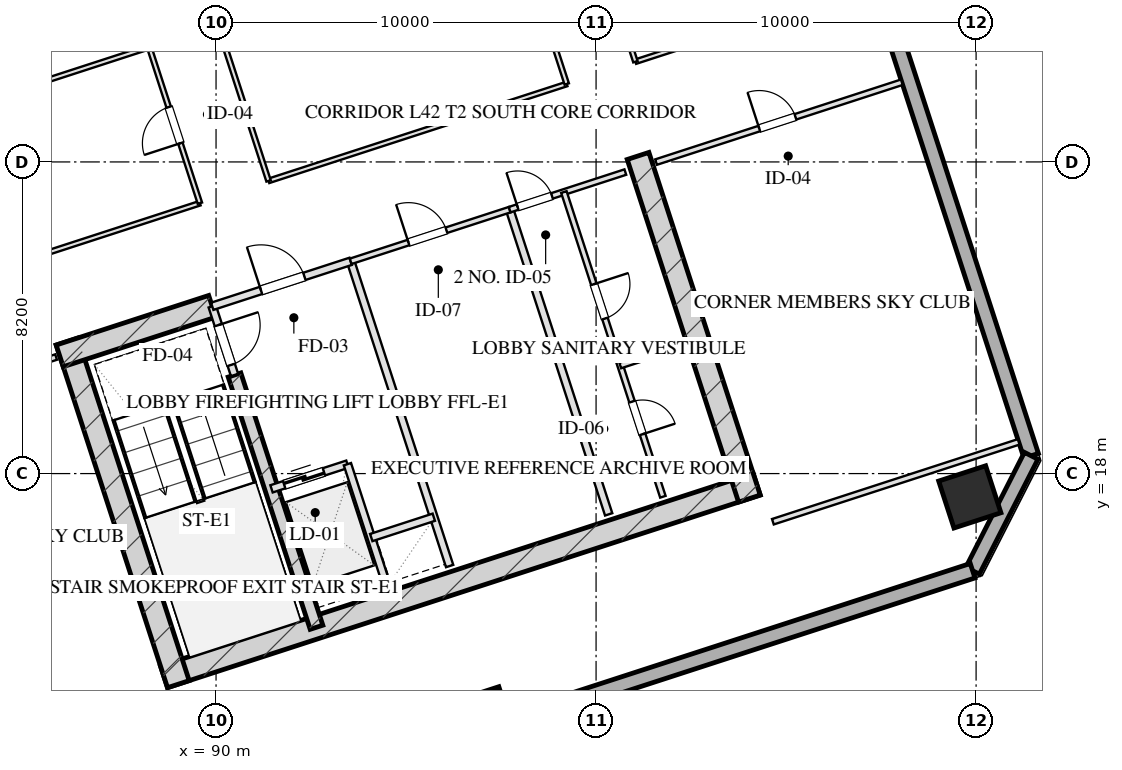
"""IFC4 building model, lengths in metres.
Left out: names, types, materials, properties, quantities, classifications, styles, units other than length and angle.
Written with IfcOpenShell. Run it as: python <this file> out.ifc"""

import sys

from ifc_helpers import new_model, si_unit, direction, frame, frame_2d, origin, origin_2d, place, context, subcontext, project, spatial, rectangle, hollow_rectangle, extrude, element, fill, save


model = new_model("IFC4")
c1 = context("Model", 3, precision=1e-05, world=origin(), true_north=direction((0.0, 1.0)))
c2 = subcontext(c1, "Body", "Model", "MODEL_VIEW")
j1 = project(units=[si_unit("LENGTHUNIT", "METRE"), si_unit("PLANEANGLEUNIT", "RADIAN")], contexts=[c1])
p1 = place(None, origin())
s1 = spatial("IfcSite", under=j1, at=p1, CompositionType="ELEMENT")
p2 = place(p1, origin())
s2 = spatial("IfcBuilding", under=s1, at=p2, CompositionType="ELEMENT")
p3 = place(p2, frame((0.0, 0.0, 159.85)))
s3 = spatial("IfcBuildingStorey", under=s2, at=p3, CompositionType="ELEMENT", Elevation=159.85)
p4 = place(p3, frame((88.63, 12.652, 0.0), z_axis=(0.0, 0.0, 1.0), x_axis=(0.95105714907, 0.309015046886, 0.0)))
e1 = element("IfcWall", 1, at=p4, inside=s3, PredefinedType="SHEAR", context=c2, shape_type="SweptSolid", body=[
    extrude(rectangle(XDim=16.4, YDim=0.6, at=frame_2d((8.2, 0.0))), origin(), (0.0, 0.0, 1.0), 3.45),
])
p5 = place(p3, frame((86.078, 21.475, 0.0), z_axis=(0.0, 0.0, 1.0), x_axis=(0.309017938678, -0.951056209472, 0.0)))
e2 = element("IfcWall", 2, at=p5, inside=s3, PredefinedType="SHEAR", context=c2, shape_type="SweptSolid", body=[
    extrude(rectangle(XDim=9.48, YDim=0.6, at=frame_2d((4.74, 0.0))), origin(), (0.0, 0.0, 1.0), 3.45),
])
p6 = place(p3, frame((101.105, 26.358, 0.0), z_axis=(0.0, 0.0, 1.0), x_axis=(0.309010370028, -0.95105866865, 0.0)))
e3 = element("IfcWall", 3, at=p6, inside=s3, PredefinedType="SHEAR", context=c2, shape_type="SweptSolid", body=[
    extrude(rectangle(XDim=9.48, YDim=0.6, at=frame_2d((4.74, 0.0))), origin(), (0.0, 0.0, 1.0), 3.45),
])
p7 = place(p3, frame((90.486, 20.594, 0.0), z_axis=(0.0, 0.0, 1.0), x_axis=(0.309020428229, -0.951055400562, 0.0)))
e4 = element("IfcWall", 4, at=p7, inside=s3, PredefinedType="SHEAR", context=c2, shape_type="SweptSolid", body=[
    extrude(rectangle(XDim=6.98, YDim=0.35, at=frame_2d((3.49, 0.0))), origin(), (0.0, 0.0, 1.0), 3.45),
])
p8 = place(p3, frame((85.886, 21.097, 0.0), z_axis=(0.0, 0.0, 1.0), x_axis=(0.951068073652, 0.308981422225, 0.0)))
e5 = element("IfcWall", 5, at=p8, inside=s3, PredefinedType="SHEAR", context=c2, shape_type="SweptSolid", body=[
    extrude(rectangle(XDim=4.22, YDim=0.6, at=frame_2d((2.11, 0.0))), origin(), (0.0, 0.0, 1.0), 3.45),
])
p9 = place(p3, frame((109.835, 17.386, 0.0), z_axis=(0.0, 0.0, 1.0), x_axis=(0.951056516295, 0.309016994375, 0.0)))
e6 = element("IfcColumn", 6, at=p9, inside=s3, PredefinedType="COLUMN", context=c2, shape_type="SweptSolid", body=[
    extrude(hollow_rectangle(XDim=1.3, YDim=1.3, WallThickness=0.045, at=origin_2d()), origin(), (0.0, 0.0, 1.0), 3.451),
])
p10 = place(p3, frame((97.185, 11.888, 0.0), z_axis=(0.0, 0.0, 1.0), x_axis=(0.951056516295, 0.309016994375, 0.0)))
e7 = element("IfcColumn", 7, at=p10, inside=s3, PredefinedType="COLUMN", context=c2, shape_type="SweptSolid", body=[
    extrude(hollow_rectangle(XDim=0.8, YDim=0.8, WallThickness=0.028, at=origin_2d()), origin(), (0.0, 0.0, 1.0), 3.451),
])
p11 = place(p3, frame((98.224, 59.173, 0.0), z_axis=(0.0, 0.0, 1.0), x_axis=(0.309014228706, -0.951057414911, 0.0)))
e8 = element("IfcWall", 8, at=p11, inside=s3, PredefinedType="SOLIDWALL", context=c2, shape_type="SweptSolid", body=[
    extrude(rectangle(XDim=42.8, YDim=0.4, at=frame_2d((21.4, 0.0))), origin(), (0.0, 0.0, 1.0), 2.61),
])
p12 = place(p3, frame((111.449, 18.468, 0.0), z_axis=(0.0, 0.0, 1.0), x_axis=(-0.454019523198, -0.890991735402, 0.0)))
e9 = element("IfcWall", 9, at=p12, inside=s3, PredefinedType="SOLIDWALL", context=c2, shape_type="SweptSolid", body=[
    extrude(rectangle(XDim=3.394, YDim=0.4, at=frame_2d((1.697, 0.0))), origin(), (0.0, 0.0, 1.0), 2.61),
])
p13 = place(p3, frame((109.908, 15.444, 0.0), z_axis=(0.0, 0.0, 1.0), x_axis=(-0.951057580055, -0.30901372044, 0.0)))
e10 = element("IfcWall", 10, at=p13, inside=s3, PredefinedType="SOLIDWALL", context=c2, shape_type="SweptSolid", body=[
    extrude(rectangle(XDim=26.4, YDim=0.4, at=frame_2d((13.2, 0.0))), origin(), (0.0, 0.0, 1.0), 2.61),
])
p14 = place(p3, frame((89.899, 22.401, 0.0), z_axis=(0.0, 0.0, 1.0), x_axis=(0.308932062672, -0.951084108086, 0.0)))
e11 = element("IfcWall", 11, at=p14, inside=s3, PredefinedType="PARTITIONING", context=c2, shape_type="SweptSolid", body=[
    extrude(rectangle(XDim=1.9, YDim=0.2, at=frame_2d((0.95, 0.0))), origin(), (0.0, 0.0, 1.0), 3.175),
])
p15 = place(p14, frame((0.52, 0.0, 0.0)))
e12 = element("IfcOpeningElement", 12, at=p15, cuts=e11, PredefinedType="OPENING", context=c2, shape_type="SweptSolid", body=[
    extrude(rectangle(XDim=1.1, YDim=2.05, at=frame_2d((0.55, 1.025))), frame((0.0, 0.11, 0.0), z_axis=(0.0, -1.0, 0.0), x_axis=(1.0, 0.0, 0.0)), (0.0, 0.0, 1.0), 0.22),
])
p16 = place(p3, frame((93.542, 23.585, 0.0), z_axis=(0.0, 0.0, 1.0), x_axis=(0.309042196757, -0.951048327176, 0.0)))
e13 = element("IfcWall", 13, at=p16, inside=s3, PredefinedType="PARTITIONING", context=c2, shape_type="SweptSolid", body=[
    extrude(rectangle(XDim=8.43, YDim=0.2, at=frame_2d((4.215, 0.0))), origin(), (0.0, 0.0, 1.0), 3.175),
])
p17 = place(p3, frame((89.899, 22.401, 0.0), z_axis=(0.0, 0.0, 1.0), x_axis=(0.951046716504, 0.309047153403, 0.0)))
e14 = element("IfcWall", 14, at=p17, inside=s3, PredefinedType="PARTITIONING", context=c2, shape_type="SweptSolid", body=[
    extrude(rectangle(XDim=3.83, YDim=0.2, at=frame_2d((1.915, 0.0))), origin(), (0.0, 0.0, 1.0), 3.175),
])
p18 = place(p17, frame((1.35, 0.0, 0.0)))
e15 = element("IfcOpeningElement", 15, at=p18, cuts=e14, PredefinedType="OPENING", context=c2, shape_type="SweptSolid", body=[
    extrude(rectangle(XDim=1.2, YDim=2.05, at=frame_2d((0.6, 1.025))), frame((0.0, 0.11, 0.0), z_axis=(0.0, -1.0, 0.0), x_axis=(1.0, 0.0, 0.0)), (0.0, 0.0, 1.0), 0.22),
])
p19 = place(p3, frame((91.46, 17.598, 0.0), z_axis=(0.0, 0.0, 1.0), x_axis=(0.951062257173, 0.308999325213, 0.0)))
e16 = element("IfcWall", 16, at=p19, inside=s3, PredefinedType="PARTITIONING", context=c2, shape_type="SweptSolid", body=[
    extrude(rectangle(XDim=2.1, YDim=0.2, at=frame_2d((1.05, 0.0))), origin(), (0.0, 0.0, 1.0), 3.175),
])
p20 = place(p19, frame((0.35, 0.0, 0.0)))
e17 = element("IfcOpeningElement", 17, at=p20, cuts=e16, PredefinedType="OPENING", context=c2, shape_type="SweptSolid", body=[
    extrude(rectangle(XDim=1.1, YDim=2.05, at=frame_2d((0.55, 1.025))), frame((0.0, 0.11, 0.0), z_axis=(0.0, -1.0, 0.0), x_axis=(1.0, 0.0, 0.0)), (0.0, 0.0, 1.0), 0.22),
])
p21 = place(p3, frame((93.457, 18.247, 0.0), z_axis=(0.0, 0.0, 1.0), x_axis=(0.3089935693, -0.951064127245, 0.0)))
e18 = element("IfcWall", 18, at=p21, inside=s3, PredefinedType="PARTITIONING", context=c2, shape_type="SweptSolid", body=[
    extrude(rectangle(XDim=3.7, YDim=0.2, at=frame_2d((1.85, 0.0))), origin(), (0.0, 0.0, 1.0), 3.175),
])
p22 = place(p3, frame((94.084, 16.317, 0.0), z_axis=(0.0, 0.0, 1.0), x_axis=(0.951041328149, 0.309063734775, 0.0)))
e19 = element("IfcWall", 19, at=p22, inside=s3, PredefinedType="PARTITIONING", context=c2, shape_type="SweptSolid", body=[
    extrude(rectangle(XDim=1.73, YDim=0.2, at=frame_2d((0.865, 0.0))), origin(), (0.0, 0.0, 1.0), 3.175),
])
p23 = place(p3, frame((97.727, 24.944, 0.0), z_axis=(0.0, 0.0, 1.0), x_axis=(0.309016001439, -0.951056838919, 0.0)))
e20 = element("IfcWall", 20, at=p23, inside=s3, PredefinedType="PARTITIONING", context=c2, shape_type="SweptSolid", body=[
    extrude(rectangle(XDim=8.43, YDim=0.2, at=frame_2d((4.215, 0.0))), origin(), (0.0, 0.0, 1.0), 3.175),
])
p24 = place(p3, frame((93.542, 23.585, 0.0), z_axis=(0.0, 0.0, 1.0), x_axis=(0.951063829732, 0.308994485023, 0.0)))
e21 = element("IfcWall", 21, at=p24, inside=s3, PredefinedType="PARTITIONING", context=c2, shape_type="SweptSolid", body=[
    extrude(rectangle(XDim=4.4, YDim=0.15, at=frame_2d((2.2, 0.0))), origin(), (0.0, 0.0, 1.0), 3.175),
])
p25 = place(p24, frame((1.6, 0.0, 0.0)))
e22 = element("IfcOpeningElement", 22, at=p25, cuts=e21, PredefinedType="OPENING", context=c2, shape_type="SweptSolid", body=[
    extrude(rectangle(XDim=1.05, YDim=2.05, at=frame_2d((0.525, 1.025))), frame((0.0, 0.085, 0.0), z_axis=(0.0, -1.0, 0.0), x_axis=(1.0, 0.0, 0.0)), (0.0, 0.0, 1.0), 0.17),
])
p26 = place(p3, frame((97.727, 24.944, 0.0), z_axis=(0.0, 0.0, 1.0), x_axis=(0.951036872128, 0.309077446369, 0.0)))
e23 = element("IfcWall", 23, at=p26, inside=s3, PredefinedType="PARTITIONING", context=c2, shape_type="SweptSolid", body=[
    extrude(rectangle(XDim=3.2, YDim=0.15, at=frame_2d((1.6, 0.0))), origin(), (0.0, 0.0, 1.0), 3.175),
])
p27 = place(p26, frame((0.22, 0.0, 0.0)))
e24 = element("IfcOpeningElement", 24, at=p27, cuts=e23, PredefinedType="OPENING", context=c2, shape_type="SweptSolid", body=[
    extrude(rectangle(XDim=0.95, YDim=2.05, at=frame_2d((0.475, 1.025))), frame((0.0, 0.085, 0.0), z_axis=(0.0, -1.0, 0.0), x_axis=(1.0, 0.0, 0.0)), (0.0, 0.0, 1.0), 0.17),
])
p28 = place(p3, frame((99.153, 25.408, 0.0), z_axis=(0.0, 0.0, 1.0), x_axis=(0.309016001439, -0.951056838919, 0.0)))
e25 = element("IfcWall", 25, at=p28, inside=s3, PredefinedType="PARTITIONING", context=c2, shape_type="SweptSolid", body=[
    extrude(rectangle(XDim=8.43, YDim=0.15, at=frame_2d((4.215, 0.0))), origin(), (0.0, 0.0, 1.0), 3.175),
])
p29 = place(p28, frame((2.55, 0.0, 0.0)))
e26 = element("IfcOpeningElement", 26, at=p29, cuts=e25, PredefinedType="OPENING", context=c2, shape_type="SweptSolid", body=[
    extrude(rectangle(XDim=0.95, YDim=2.05, at=frame_2d((0.475, 1.025))), frame((0.0, 0.085, 0.0), z_axis=(0.0, -1.0, 0.0), x_axis=(1.0, 0.0, 0.0)), (0.0, 0.0, 1.0), 0.17),
])
p30 = place(p28, frame((5.8, 0.0, 0.0)))
e27 = element("IfcOpeningElement", 27, at=p30, cuts=e25, PredefinedType="OPENING", context=c2, shape_type="SweptSolid", body=[
    extrude(rectangle(XDim=0.9, YDim=2.05, at=frame_2d((0.45, 1.025))), frame((0.0, 0.085, 0.0), z_axis=(0.0, -1.0, 0.0), x_axis=(1.0, 0.0, 0.0)), (0.0, 0.0, 1.0), 0.17),
])
p31 = place(p3, frame((100.636, 20.843, 0.0), z_axis=(0.0, 0.0, 1.0), x_axis=(0.951040401051, 0.309066587596, 0.0)))
e28 = element("IfcWall", 28, at=p31, inside=s3, PredefinedType="PARTITIONING", context=c2, shape_type="SweptSolid", body=[
    extrude(rectangle(XDim=1.7, YDim=0.15, at=frame_2d((0.85, 0.0))), origin(), (0.0, 0.0, 1.0), 3.175),
])
p32 = place(p3, frame((78.753, 18.78, 0.0), z_axis=(0.0, 0.0, 1.0), x_axis=(0.951060977215, 0.309003264738, 0.0)))
e29 = element("IfcWall", 29, at=p32, inside=s3, PredefinedType="PARTITIONING", context=c2, shape_type="SweptSolid", body=[
    extrude(rectangle(XDim=7.4, YDim=0.15, at=frame_2d((3.7, 0.0))), origin(), (0.0, 0.0, 1.0), 3.175),
])
p33 = place(p32, frame((3.108, 0.0, 0.0)))
e30 = element("IfcOpeningElement", 30, at=p33, cuts=e29, PredefinedType="OPENING", context=c2, shape_type="SweptSolid", body=[
    extrude(rectangle(XDim=1.05, YDim=2.05, at=frame_2d((0.525, 1.025))), frame((0.0, 0.085, 0.0), z_axis=(0.0, -1.0, 0.0), x_axis=(1.0, 0.0, 0.0)), (0.0, 0.0, 1.0), 0.17),
])
p34 = place(p3, frame((104.653, 16.733, 0.0), z_axis=(0.0, 0.0, 1.0), x_axis=(0.951054383043, 0.309023559774, 0.0)))
e31 = element("IfcWall", 31, at=p34, inside=s3, PredefinedType="PARTITIONING", context=c2, shape_type="SweptSolid", body=[
    extrude(rectangle(XDim=6.8, YDim=0.15, at=frame_2d((3.4, 0.0))), origin(), (0.0, 0.0, 1.0), 3.175),
])
p35 = place(p3, frame((101.578, 26.196, 0.0), z_axis=(0.0, 0.0, 1.0), x_axis=(0.951064934653, 0.308991084134, 0.0)))
e32 = element("IfcWall", 32, at=p35, inside=s3, PredefinedType="PARTITIONING", context=c2, shape_type="SweptSolid", body=[
    extrude(rectangle(XDim=6.8, YDim=0.15, at=frame_2d((3.4, 0.0))), origin(), (0.0, 0.0, 1.0), 3.175),
])
p36 = place(p35, frame((2.856, 0.0, 0.0)))
e33 = element("IfcOpeningElement", 33, at=p36, cuts=e32, PredefinedType="OPENING", context=c2, shape_type="SweptSolid", body=[
    extrude(rectangle(XDim=1.0, YDim=2.05, at=frame_2d((0.5, 1.025))), frame((0.0, 0.085, 0.0), z_axis=(0.0, -1.0, 0.0), x_axis=(1.0, 0.0, 0.0)), (0.0, 0.0, 1.0), 0.17),
])
p37 = place(p3, frame((77.925, 21.328, 0.0), z_axis=(0.0, 0.0, 1.0), x_axis=(0.95105749975, 0.309013967595, 0.0)))
e34 = element("IfcWall", 34, at=p37, inside=s3, PredefinedType="PARTITIONING", context=c2, shape_type="SweptSolid", body=[
    extrude(rectangle(XDim=12.25, YDim=0.12, at=frame_2d((6.125, 0.0))), origin(), (0.0, 0.0, 1.0), 3.175),
])
p38 = place(p3, frame((91.382, 25.701, 0.0), z_axis=(0.0, 0.0, 1.0), x_axis=(0.951061683147, 0.309001091988, 0.0)))
e35 = element("IfcWall", 35, at=p38, inside=s3, PredefinedType="PARTITIONING", context=c2, shape_type="SweptSolid", body=[
    extrude(rectangle(XDim=8.25, YDim=0.12, at=frame_2d((4.125, 0.0))), origin(), (0.0, 0.0, 1.0), 3.175),
])
p39 = place(p3, frame((101.035, 28.837, 0.0), z_axis=(0.0, 0.0, 1.0), x_axis=(0.95104869662, 0.309041059824, 0.0)))
e36 = element("IfcWall", 36, at=p39, inside=s3, PredefinedType="PARTITIONING", context=c2, shape_type="SweptSolid", body=[
    extrude(rectangle(XDim=6.5, YDim=0.12, at=frame_2d((3.25, 0.0))), origin(), (0.0, 0.0, 1.0), 3.175),
])
p40 = place(p3, frame((89.575, 25.114, 0.0), z_axis=(0.0, 0.0, 1.0), x_axis=(-0.30901773025, 0.951056277195, 0.0)))
e37 = element("IfcWall", 37, at=p40, inside=s3, PredefinedType="PARTITIONING", context=c2, shape_type="SweptSolid", body=[
    extrude(rectangle(XDim=16.64, YDim=0.12, at=frame_2d((8.32, 0.0))), origin(), (0.0, 0.0, 1.0), 3.175),
])
p41 = place(p40, frame((1.66, 0.0, 0.0)))
e38 = element("IfcOpeningElement", 38, at=p41, cuts=e37, PredefinedType="OPENING", context=c2, shape_type="SweptSolid", body=[
    extrude(rectangle(XDim=1.0, YDim=2.05, at=frame_2d((0.5, 1.025))), frame((0.0, 0.07, 0.0), z_axis=(0.0, -1.0, 0.0), x_axis=(1.0, 0.0, 0.0)), (0.0, 0.0, 1.0), 0.14),
])
p42 = place(p40, frame((7.82, 0.0, 0.0)))
e39 = element("IfcOpeningElement", 39, at=p42, cuts=e37, PredefinedType="OPENING", context=c2, shape_type="SweptSolid", body=[
    extrude(rectangle(XDim=1.0, YDim=2.05, at=frame_2d((0.5, 1.025))), frame((0.0, 0.07, 0.0), z_axis=(0.0, -1.0, 0.0), x_axis=(1.0, 0.0, 0.0)), (0.0, 0.0, 1.0), 0.14),
])
p43 = place(p40, frame((13.98, 0.0, 0.0)))
e40 = element("IfcOpeningElement", 40, at=p43, cuts=e37, PredefinedType="OPENING", context=c2, shape_type="SweptSolid", body=[
    extrude(rectangle(XDim=1.0, YDim=2.05, at=frame_2d((0.5, 1.025))), frame((0.0, 0.07, 0.0), z_axis=(0.0, -1.0, 0.0), x_axis=(1.0, 0.0, 0.0)), (0.0, 0.0, 1.0), 0.14),
])
p44 = place(p3, frame((91.382, 25.701, 0.0), z_axis=(0.0, 0.0, 1.0), x_axis=(-0.309004459387, 0.951060589068, 0.0)))
e41 = element("IfcWall", 41, at=p44, inside=s3, PredefinedType="PARTITIONING", context=c2, shape_type="SweptSolid", body=[
    extrude(rectangle(XDim=16.64, YDim=0.12, at=frame_2d((8.32, 0.0))), origin(), (0.0, 0.0, 1.0), 3.175),
])
p45 = place(p44, frame((7.987, 0.0, 0.0)))
e42 = element("IfcOpeningElement", 42, at=p45, cuts=e41, PredefinedType="OPENING", context=c2, shape_type="SweptSolid", body=[
    extrude(rectangle(XDim=1.1, YDim=2.05, at=frame_2d((0.55, 1.025))), frame((0.0, 0.07, 0.0), z_axis=(0.0, -1.0, 0.0), x_axis=(1.0, 0.0, 0.0)), (0.0, 0.0, 1.0), 0.14),
])
p46 = place(p3, frame((99.229, 28.25, 0.0), z_axis=(0.0, 0.0, 1.0), x_axis=(-0.30901773025, 0.951056277195, 0.0)))
e43 = element("IfcWall", 43, at=p46, inside=s3, PredefinedType="PARTITIONING", context=c2, shape_type="SweptSolid", body=[
    extrude(rectangle(XDim=16.64, YDim=0.12, at=frame_2d((8.32, 0.0))), origin(), (0.0, 0.0, 1.0), 3.175),
])
p47 = place(p3, frame((101.035, 28.837, 0.0), z_axis=(0.0, 0.0, 1.0), x_axis=(-0.30901773025, 0.951056277195, 0.0)))
e44 = element("IfcWall", 44, at=p47, inside=s3, PredefinedType="PARTITIONING", context=c2, shape_type="SweptSolid", body=[
    extrude(rectangle(XDim=16.64, YDim=0.12, at=frame_2d((8.32, 0.0))), origin(), (0.0, 0.0, 1.0), 3.175),
])
p48 = place(p47, frame((1.16, 0.0, 0.0)))
e45 = element("IfcOpeningElement", 45, at=p48, cuts=e44, PredefinedType="OPENING", context=c2, shape_type="SweptSolid", body=[
    extrude(rectangle(XDim=1.0, YDim=2.05, at=frame_2d((0.5, 1.025))), frame((0.0, 0.07, 0.0), z_axis=(0.0, -1.0, 0.0), x_axis=(1.0, 0.0, 0.0)), (0.0, 0.0, 1.0), 0.14),
])
p49 = place(p47, frame((4.72, 0.0, 0.0)))
e46 = element("IfcOpeningElement", 46, at=p49, cuts=e44, PredefinedType="OPENING", context=c2, shape_type="SweptSolid", body=[
    extrude(rectangle(XDim=1.0, YDim=2.05, at=frame_2d((0.5, 1.025))), frame((0.0, 0.07, 0.0), z_axis=(0.0, -1.0, 0.0), x_axis=(1.0, 0.0, 0.0)), (0.0, 0.0, 1.0), 0.14),
])
p50 = place(p47, frame((7.82, 0.0, 0.0)))
e47 = element("IfcOpeningElement", 47, at=p50, cuts=e44, PredefinedType="OPENING", context=c2, shape_type="SweptSolid", body=[
    extrude(rectangle(XDim=0.85, YDim=2.05, at=frame_2d((0.425, 1.025))), frame((0.0, 0.07, 0.0), z_axis=(0.0, -1.0, 0.0), x_axis=(1.0, 0.0, 0.0)), (0.0, 0.0, 1.0), 0.14),
])
p51 = place(p47, frame((10.671, 0.0, 0.0)))
e48 = element("IfcOpeningElement", 48, at=p51, cuts=e44, PredefinedType="OPENING", context=c2, shape_type="SweptSolid", body=[
    extrude(rectangle(XDim=1.0, YDim=2.05, at=frame_2d((0.5, 1.025))), frame((0.0, 0.07, 0.0), z_axis=(0.0, -1.0, 0.0), x_axis=(1.0, 0.0, 0.0)), (0.0, 0.0, 1.0), 0.14),
])
p52 = place(p47, frame((13.971, 0.0, 0.0)))
e49 = element("IfcOpeningElement", 49, at=p52, cuts=e44, PredefinedType="OPENING", context=c2, shape_type="SweptSolid", body=[
    extrude(rectangle(XDim=1.0, YDim=2.05, at=frame_2d((0.5, 1.025))), frame((0.0, 0.07, 0.0), z_axis=(0.0, -1.0, 0.0), x_axis=(1.0, 0.0, 0.0)), (0.0, 0.0, 1.0), 0.14),
])
p53 = place(p3, frame((76.59, 25.437, 0.0), z_axis=(0.0, 0.0, 1.0), x_axis=(0.95105749975, 0.309013967595, 0.0)))
e50 = element("IfcWall", 50, at=p53, inside=s3, PredefinedType="PARTITIONING", context=c2, shape_type="SweptSolid", body=[
    extrude(rectangle(XDim=12.25, YDim=0.12, at=frame_2d((6.125, 0.0))), origin(), (0.0, 0.0, 1.0), 3.175),
])
p54 = place(p15, origin())
e51 = element("IfcDoor", 51, at=p54, inside=s3, OperationType="SINGLE_SWING_LEFT", PredefinedType="DOOR", context=c2, shape_type="SweptSolid", body=[
    extrude(rectangle(XDim=1.1, YDim=2.05, at=frame_2d((0.55, 1.025))), frame((0.0, 0.025, 0.0), z_axis=(0.0, -1.0, 0.0), x_axis=(1.0, 0.0, 0.0)), (0.0, 0.0, 1.0), 0.05),
])
fill(e12, e51)
p55 = place(p18, origin())
e52 = element("IfcDoor", 52, at=p55, inside=s3, OperationType="SINGLE_SWING_LEFT", PredefinedType="DOOR", context=c2, shape_type="SweptSolid", body=[
    extrude(rectangle(XDim=1.2, YDim=2.05, at=frame_2d((0.6, 1.025))), frame((0.0, 0.025, 0.0), z_axis=(0.0, -1.0, 0.0), x_axis=(1.0, 0.0, 0.0)), (0.0, 0.0, 1.0), 0.05),
])
fill(e15, e52)
p56 = place(p20, origin())
e53 = element("IfcDoor", 53, at=p56, inside=s3, OperationType="DOUBLE_DOOR_SLIDING", PredefinedType="DOOR", context=c2, shape_type="SweptSolid", body=[
    extrude(rectangle(XDim=1.1, YDim=2.05, at=frame_2d((0.55, 1.025))), frame((0.0, 0.025, 0.0), z_axis=(0.0, -1.0, 0.0), x_axis=(1.0, 0.0, 0.0)), (0.0, 0.0, 1.0), 0.05),
])
fill(e17, e53)
p57 = place(p25, origin())
e54 = element("IfcDoor", 54, at=p57, inside=s3, OperationType="SINGLE_SWING_LEFT", PredefinedType="DOOR", context=c2, shape_type="SweptSolid", body=[
    extrude(rectangle(XDim=1.05, YDim=2.05, at=frame_2d((0.525, 1.025))), frame((0.0, 0.025, 0.0), z_axis=(0.0, -1.0, 0.0), x_axis=(1.0, 0.0, 0.0)), (0.0, 0.0, 1.0), 0.05),
])
fill(e22, e54)
p58 = place(p27, origin())
e55 = element("IfcDoor", 55, at=p58, inside=s3, OperationType="SINGLE_SWING_LEFT", PredefinedType="DOOR", context=c2, shape_type="SweptSolid", body=[
    extrude(rectangle(XDim=0.95, YDim=2.05, at=frame_2d((0.475, 1.025))), frame((0.0, 0.025, 0.0), z_axis=(0.0, -1.0, 0.0), x_axis=(1.0, 0.0, 0.0)), (0.0, 0.0, 1.0), 0.05),
])
fill(e24, e55)
p59 = place(p29, origin())
e56 = element("IfcDoor", 56, at=p59, inside=s3, OperationType="SINGLE_SWING_LEFT", PredefinedType="DOOR", context=c2, shape_type="SweptSolid", body=[
    extrude(rectangle(XDim=0.95, YDim=2.05, at=frame_2d((0.475, 1.025))), frame((0.0, 0.025, 0.0), z_axis=(0.0, -1.0, 0.0), x_axis=(1.0, 0.0, 0.0)), (0.0, 0.0, 1.0), 0.05),
])
fill(e26, e56)
p60 = place(p30, origin())
e57 = element("IfcDoor", 57, at=p60, inside=s3, OperationType="SINGLE_SWING_RIGHT", PredefinedType="DOOR", context=c2, shape_type="SweptSolid", body=[
    extrude(rectangle(XDim=0.9, YDim=2.05, at=frame_2d((0.45, 1.025))), frame((0.0, 0.025, 0.0), z_axis=(0.0, -1.0, 0.0), x_axis=(1.0, 0.0, 0.0)), (0.0, 0.0, 1.0), 0.05),
])
fill(e27, e57)
p61 = place(p36, origin())
e58 = element("IfcDoor", 58, at=p61, inside=s3, OperationType="SINGLE_SWING_LEFT", PredefinedType="DOOR", context=c2, shape_type="SweptSolid", body=[
    extrude(rectangle(XDim=1.0, YDim=2.05, at=frame_2d((0.5, 1.025))), frame((0.0, 0.025, 0.0), z_axis=(0.0, -1.0, 0.0), x_axis=(1.0, 0.0, 0.0)), (0.0, 0.0, 1.0), 0.05),
])
fill(e33, e58)
p62 = place(p41, origin())
e59 = element("IfcDoor", 59, at=p62, inside=s3, OperationType="SINGLE_SWING_LEFT", PredefinedType="DOOR", context=c2, shape_type="SweptSolid", body=[
    extrude(rectangle(XDim=1.0, YDim=2.05, at=frame_2d((0.5, 1.025))), frame((0.0, 0.025, 0.0), z_axis=(0.0, -1.0, 0.0), x_axis=(1.0, 0.0, 0.0)), (0.0, 0.0, 1.0), 0.05),
])
fill(e38, e59)
save(model, sys.argv[1])
